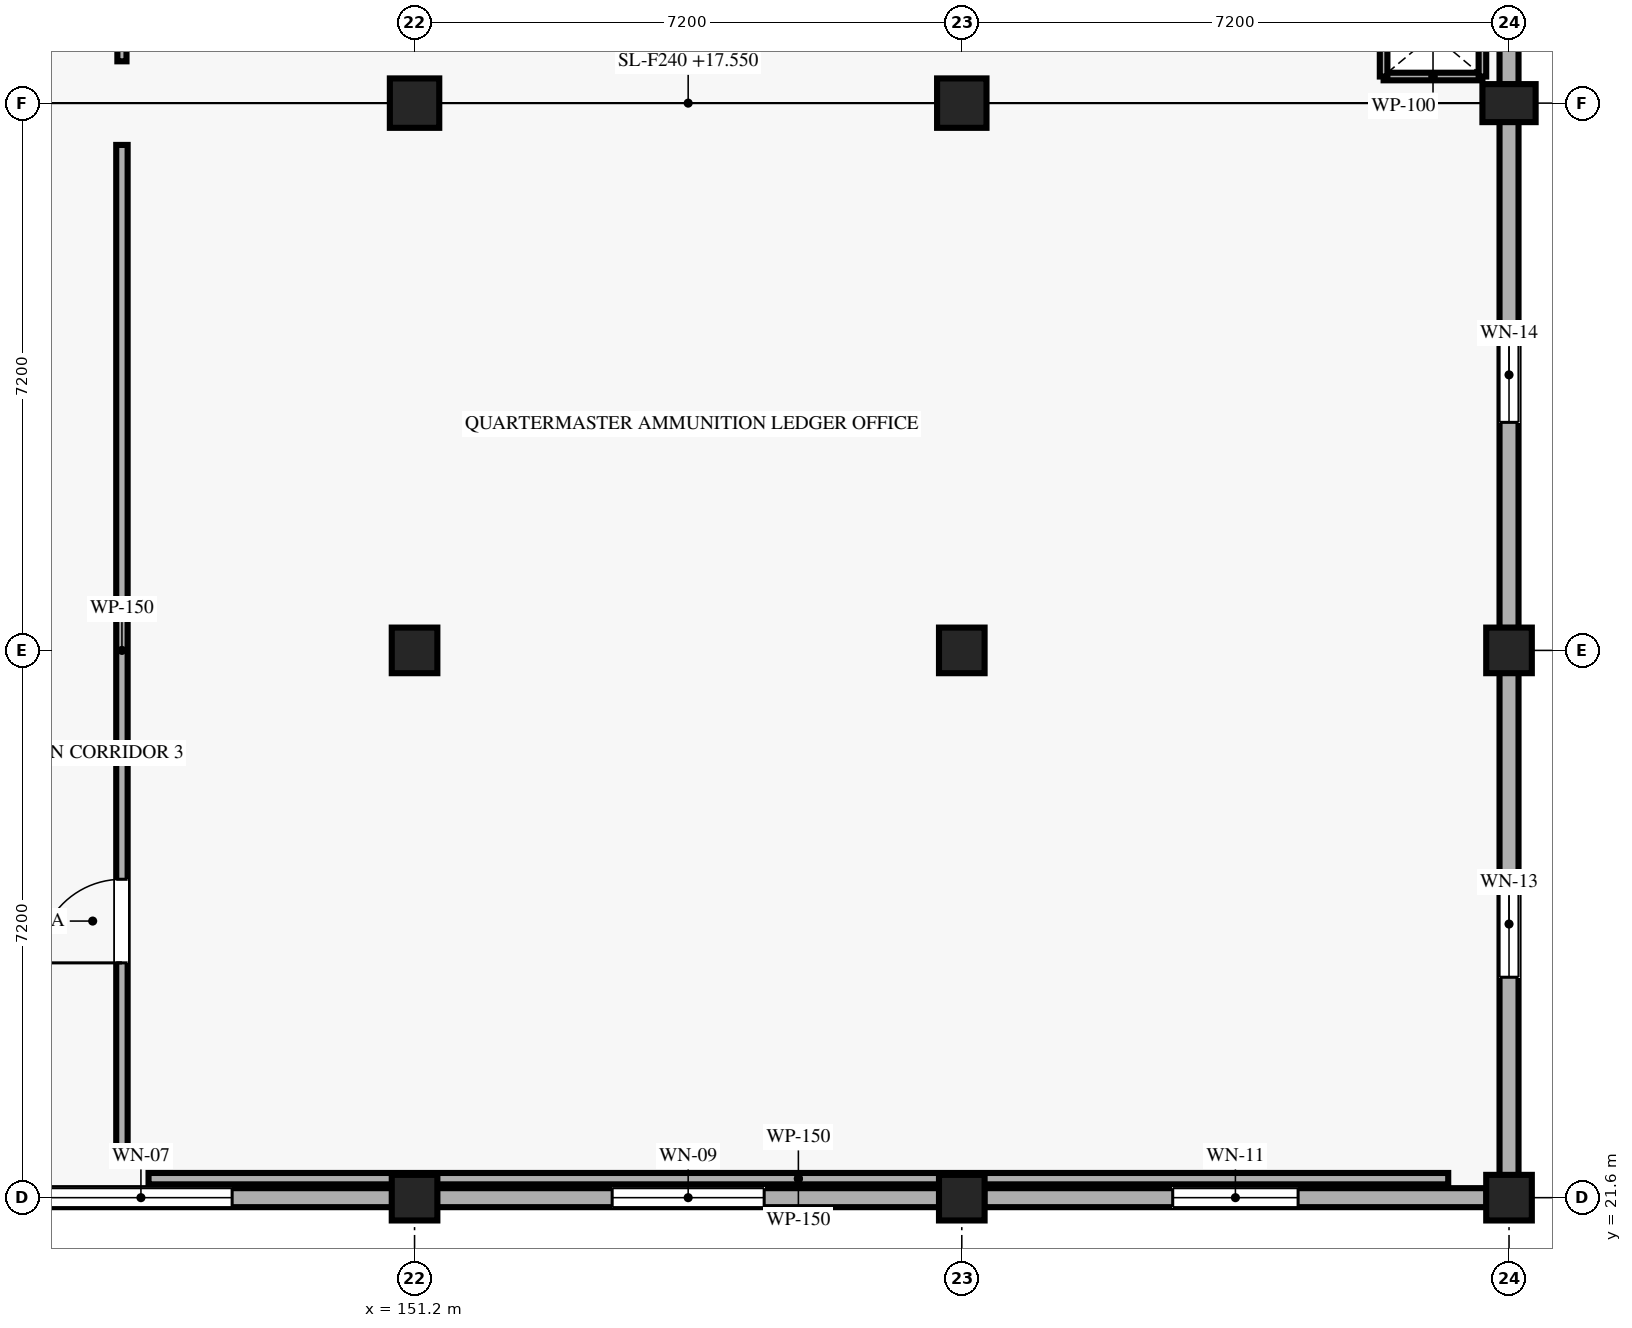
"""IFC4 building model, lengths in metres.
Left out: names, types, materials, properties, quantities, classifications, styles, units other than length and angle.
Written with IfcOpenShell. Run it as: python <this file> out.ifc"""

import sys

from ifc_helpers import new_model, si_unit, direction, frame, frame_2d, origin, origin_2d, place, context, subcontext, project, spatial, rectangle, extrude, element, fill, save


model = new_model("IFC4")
c1 = context("Model", 3, precision=1e-05, world=origin(), true_north=direction((0.0, 1.0)))
c2 = subcontext(c1, "Body", "Model", "MODEL_VIEW")
j1 = project(units=[si_unit("LENGTHUNIT", "METRE"), si_unit("PLANEANGLEUNIT", "RADIAN")], contexts=[c1])
p1 = place(None, origin())
s1 = spatial("IfcSite", under=j1, at=p1, CompositionType="ELEMENT")
p2 = place(p1, origin())
s2 = spatial("IfcBuilding", under=s1, at=p2, CompositionType="ELEMENT")
p3 = place(p2, frame((0.0, 0.0, 17.55)))
s3 = spatial("IfcBuildingStorey", under=s2, at=p3, CompositionType="ELEMENT", Elevation=17.55)
for number, where, z_axis, x_axis in (
    (1, (151.2, 21.6, 0.0), (0.0, 0.0, 1.0), (1.0, 0.0, 0.0)),
    (2, (151.2, 28.8, 0.0), (0.0, 0.0, 1.0), (1.0, 0.0, 0.0)),
):
    element("IfcColumn", number, at=place(p3, frame(where, z_axis=z_axis, x_axis=x_axis)), inside=s3, PredefinedType="COLUMN", context=c2, shape_type="SweptSolid", body=[
        extrude(rectangle(XDim=0.6, YDim=0.6, at=origin_2d()), origin(), (0.0, 0.0, 1.0), 4.05),
    ])
p4 = place(p3, frame((151.2, 36.0, 0.0), z_axis=(0.0, 0.0, 1.0), x_axis=(1.0, 0.0, 0.0)))
e3 = element("IfcColumn", 3, at=p4, inside=s3, PredefinedType="COLUMN", context=c2, shape_type="SweptSolid", body=[
    extrude(rectangle(XDim=0.65, YDim=0.65, at=origin_2d()), origin(), (0.0, 0.0, 1.0), 4.05),
])
for number, where, z_axis, x_axis in (
    (4, (158.4, 21.6, 0.0), (0.0, 0.0, 1.0), (1.0, 0.0, 0.0)),
    (5, (158.4, 28.8, 0.0), (0.0, 0.0, 1.0), (1.0, 0.0, 0.0)),
):
    element("IfcColumn", number, at=place(p3, frame(where, z_axis=z_axis, x_axis=x_axis)), inside=s3, PredefinedType="COLUMN", context=c2, shape_type="SweptSolid", body=[
        extrude(rectangle(XDim=0.6, YDim=0.6, at=origin_2d()), origin(), (0.0, 0.0, 1.0), 4.05),
    ])
p5 = place(p3, frame((158.4, 36.0, 0.0), z_axis=(0.0, 0.0, 1.0), x_axis=(1.0, 0.0, 0.0)))
e6 = element("IfcColumn", 6, at=p5, inside=s3, PredefinedType="COLUMN", context=c2, shape_type="SweptSolid", body=[
    extrude(rectangle(XDim=0.65, YDim=0.65, at=origin_2d()), origin(), (0.0, 0.0, 1.0), 4.05),
])
for number, where, z_axis, x_axis in (
    (7, (165.6, 21.6, 0.0), (0.0, 0.0, 1.0), (1.0, 0.0, 0.0)),
    (8, (165.6, 28.8, 0.0), (0.0, 0.0, 1.0), (1.0, 0.0, 0.0)),
):
    element("IfcColumn", number, at=place(p3, frame(where, z_axis=z_axis, x_axis=x_axis)), inside=s3, PredefinedType="COLUMN", context=c2, shape_type="SweptSolid", body=[
        extrude(rectangle(XDim=0.6, YDim=0.6, at=origin_2d()), origin(), (0.0, 0.0, 1.0), 4.05),
    ])
p6 = place(p3, frame((165.6, 36.0, 0.0), z_axis=(0.0, 0.0, 1.0), x_axis=(0.0, 1.0, 0.0)))
e9 = element("IfcColumn", 9, at=p6, inside=s3, PredefinedType="COLUMN", context=c2, shape_type="SweptSolid", body=[
    extrude(rectangle(XDim=0.5, YDim=0.7, at=origin_2d()), origin(), (0.0, 0.0, 1.0), 4.05),
])
p7 = place(p3, frame((144.295, 21.6, 0.0), z_axis=(0.0, 0.0, 1.0), x_axis=(1.0, 0.0, 0.0)))
e10 = element("IfcWall", 10, at=p7, inside=s3, PredefinedType="SOLIDWALL", context=c2, shape_type="SweptSolid", body=[
    extrude(rectangle(XDim=6.61, YDim=0.25, at=frame_2d((3.305, 0.0))), origin(), (0.0, 0.0, 1.0), 3.295),
])
p8 = place(p7, frame((2.105, 0.0, 0.85)))
e11 = element("IfcOpeningElement", 11, at=p8, cuts=e10, PredefinedType="OPENING", context=c2, shape_type="SweptSolid", body=[
    extrude(rectangle(XDim=2.4, YDim=1.75, at=frame_2d((1.2, 0.875))), frame((0.0, 0.135, 0.0), z_axis=(0.0, -1.0, 0.0), x_axis=(1.0, 0.0, 0.0)), (0.0, 0.0, 1.0), 0.27),
])
p9 = place(p3, frame((151.495, 21.6, 0.0), z_axis=(0.0, 0.0, 1.0), x_axis=(1.0, 0.0, 0.0)))
e12 = element("IfcWall", 12, at=p9, inside=s3, PredefinedType="SOLIDWALL", context=c2, shape_type="SweptSolid", body=[
    extrude(rectangle(XDim=6.61, YDim=0.25, at=frame_2d((3.305, 0.0))), origin(), (0.0, 0.0, 1.0), 3.295),
])
p10 = place(p9, frame((2.305, 0.0, 0.85)))
e13 = element("IfcOpeningElement", 13, at=p10, cuts=e12, PredefinedType="OPENING", context=c2, shape_type="SweptSolid", body=[
    extrude(rectangle(XDim=2.0, YDim=1.65, at=frame_2d((1.0, 0.825))), frame((0.0, 0.135, 0.0), z_axis=(0.0, -1.0, 0.0), x_axis=(1.0, 0.0, 0.0)), (0.0, 0.0, 1.0), 0.27),
])
p11 = place(p3, frame((158.695, 21.6, 0.0), z_axis=(0.0, 0.0, 1.0), x_axis=(1.0, 0.0, 0.0)))
e14 = element("IfcWall", 14, at=p11, inside=s3, PredefinedType="SOLIDWALL", context=c2, shape_type="SweptSolid", body=[
    extrude(rectangle(XDim=6.61, YDim=0.25, at=frame_2d((3.305, 0.0))), origin(), (0.0, 0.0, 1.0), 3.295),
])
p12 = place(p11, frame((2.48, 0.0, 0.85)))
e15 = element("IfcOpeningElement", 15, at=p12, cuts=e14, PredefinedType="OPENING", context=c2, shape_type="SweptSolid", body=[
    extrude(rectangle(XDim=1.65, YDim=1.55, at=frame_2d((0.825, 0.775))), frame((0.0, 0.135, 0.0), z_axis=(0.0, -1.0, 0.0), x_axis=(1.0, 0.0, 0.0)), (0.0, 0.0, 1.0), 0.27),
])
p13 = place(p3, frame((165.6, 21.895, 0.0), z_axis=(0.0, 0.0, 1.0), x_axis=(0.0, 1.0, 0.0)))
e16 = element("IfcWall", 16, at=p13, inside=s3, PredefinedType="SOLIDWALL", context=c2, shape_type="SweptSolid", body=[
    extrude(rectangle(XDim=6.61, YDim=0.25, at=frame_2d((3.305, 0.0))), origin(), (0.0, 0.0, 1.0), 3.295),
])
p14 = place(p13, frame((2.605, 0.0, 0.85)))
e17 = element("IfcOpeningElement", 17, at=p14, cuts=e16, PredefinedType="OPENING", context=c2, shape_type="SweptSolid", body=[
    extrude(rectangle(XDim=1.4, YDim=1.6, at=frame_2d((0.7, 0.8))), frame((0.0, 0.135, 0.0), z_axis=(0.0, -1.0, 0.0), x_axis=(1.0, 0.0, 0.0)), (0.0, 0.0, 1.0), 0.27),
])
p15 = place(p3, frame((165.6, 29.095, 0.0), z_axis=(0.0, 0.0, 1.0), x_axis=(0.0, 1.0, 0.0)))
e18 = element("IfcWall", 18, at=p15, inside=s3, PredefinedType="SOLIDWALL", context=c2, shape_type="SweptSolid", body=[
    extrude(rectangle(XDim=6.66, YDim=0.25, at=frame_2d((3.33, 0.0))), origin(), (0.0, 0.0, 1.0), 3.295),
])
p16 = place(p15, frame((2.705, 0.0, 0.85)))
e19 = element("IfcOpeningElement", 19, at=p16, cuts=e18, PredefinedType="OPENING", context=c2, shape_type="SweptSolid", body=[
    extrude(rectangle(XDim=1.25, YDim=1.5, at=frame_2d((0.625, 0.75))), frame((0.0, 0.135, 0.0), z_axis=(0.0, -1.0, 0.0), x_axis=(1.0, 0.0, 0.0)), (0.0, 0.0, 1.0), 0.27),
])
p17 = place(p3, frame((165.6, 36.245, 0.0), z_axis=(0.0, 0.0, 1.0), x_axis=(0.0, 1.0, 0.0)))
e20 = element("IfcWall", 20, at=p17, inside=s3, PredefinedType="SOLIDWALL", context=c2, shape_type="SweptSolid", body=[
    extrude(rectangle(XDim=3.16, YDim=0.25, at=frame_2d((1.58, 0.0))), origin(), (0.0, 0.0, 1.0), 3.295),
])
p18 = place(p17, frame((0.955, 0.0, 0.85)))
e21 = element("IfcOpeningElement", 21, at=p18, cuts=e20, PredefinedType="OPENING", context=c2, shape_type="SweptSolid", body=[
    extrude(rectangle(XDim=1.25, YDim=1.5, at=frame_2d((0.625, 0.75))), frame((0.0, 0.135, 0.0), z_axis=(0.0, -1.0, 0.0), x_axis=(1.0, 0.0, 0.0)), (0.0, 0.0, 1.0), 0.27),
])
p19 = place(p3, frame((163.95, 36.35, 0.0), z_axis=(0.0, 0.0, 1.0), x_axis=(1.0, 0.0, 0.0)))
e22 = element("IfcWall", 22, at=p19, inside=s3, PredefinedType="PARTITIONING", context=c2, shape_type="SweptSolid", body=[
    extrude(rectangle(XDim=1.3, YDim=0.1, at=frame_2d((0.65, 0.0))), origin(), (0.0, 0.0, 1.0), 3.27),
])
p20 = place(p3, frame((163.95, 36.35, 0.0), z_axis=(0.0, 0.0, 1.0), x_axis=(0.0, 1.0, 0.0)))
e23 = element("IfcWall", 23, at=p20, inside=s3, PredefinedType="PARTITIONING", context=c2, shape_type="SweptSolid", body=[
    extrude(rectangle(XDim=1.1, YDim=0.1, at=frame_2d((0.55, 0.0))), origin(), (0.0, 0.0, 1.0), 3.83),
])
p21 = place(p3, frame((165.25, 36.35, 0.0), z_axis=(0.0, 0.0, 1.0), x_axis=(0.0, 1.0, 0.0)))
e24 = element("IfcWall", 24, at=p21, inside=s3, PredefinedType="PARTITIONING", context=c2, shape_type="SweptSolid", body=[
    extrude(rectangle(XDim=1.1, YDim=0.1, at=frame_2d((0.55, 0.0))), origin(), (0.0, 0.0, 1.0), 3.3),
])
p22 = place(p3, frame((147.35, 36.55, 0.0), z_axis=(0.0, 0.0, 1.0), x_axis=(0.0, 1.0, 0.0)))
e25 = element("IfcWall", 25, at=p22, inside=s3, PredefinedType="PARTITIONING", context=c2, shape_type="SweptSolid", body=[
    extrude(rectangle(XDim=15.95, YDim=0.12, at=frame_2d((7.975, 0.0))), origin(), (0.0, 0.0, 1.0), 3.83),
])
p23 = place(p22, frame((2.25, 0.0, 0.0)))
e26 = element("IfcOpeningElement", 26, at=p23, cuts=e25, PredefinedType="OPENING", context=c2, shape_type="SweptSolid", body=[
    extrude(rectangle(XDim=1.7, YDim=2.2, at=frame_2d((0.85, 1.1))), frame((0.0, 0.07, 0.0), z_axis=(0.0, -1.0, 0.0), x_axis=(1.0, 0.0, 0.0)), (0.0, 0.0, 1.0), 0.14),
])
p24 = place(p3, frame((147.7, 21.85, 0.0), z_axis=(0.0, 0.0, 1.0), x_axis=(1.0, 0.0, 0.0)))
e27 = element("IfcWall", 27, at=p24, inside=s3, PredefinedType="PARTITIONING", context=c2, shape_type="SweptSolid", body=[
    extrude(rectangle(XDim=17.1, YDim=0.15, at=frame_2d((8.55, 0.0))), origin(), (0.0, 0.0, 1.0), 3.3),
])
p25 = place(p3, frame((147.35, 22.15, 0.0), z_axis=(0.0, 0.0, 1.0), x_axis=(0.0, 1.0, 0.0)))
e28 = element("IfcWall", 28, at=p25, inside=s3, PredefinedType="PARTITIONING", context=c2, shape_type="SweptSolid", body=[
    extrude(rectangle(XDim=13.3, YDim=0.15, at=frame_2d((6.65, 0.0))), origin(), (0.0, 0.0, 1.0), 3.83),
])
p26 = place(p25, frame((2.539, 0.0, 0.0)))
e29 = element("IfcOpeningElement", 29, at=p26, cuts=e28, PredefinedType="OPENING", context=c2, shape_type="SweptSolid", body=[
    extrude(rectangle(XDim=1.1, YDim=2.2, at=frame_2d((0.55, 1.1))), frame((0.0, 0.085, 0.0), z_axis=(0.0, -1.0, 0.0), x_axis=(1.0, 0.0, 0.0)), (0.0, 0.0, 1.0), 0.17),
])
p27 = place(p8, origin())
e30 = element("IfcWindow", 30, at=p27, inside=s3, PartitioningType="SINGLE_PANEL", PredefinedType="WINDOW", context=c2, shape_type="SweptSolid", body=[
    extrude(rectangle(XDim=2.4, YDim=1.75, at=frame_2d((1.2, 0.875))), frame((0.0, 0.03, 0.0), z_axis=(0.0, -1.0, 0.0), x_axis=(1.0, 0.0, 0.0)), (0.0, 0.0, 1.0), 0.06),
])
fill(e11, e30)
p28 = place(p10, origin())
e31 = element("IfcWindow", 31, at=p28, inside=s3, PartitioningType="SINGLE_PANEL", PredefinedType="WINDOW", context=c2, shape_type="SweptSolid", body=[
    extrude(rectangle(XDim=2.0, YDim=1.65, at=frame_2d((1.0, 0.825))), frame((0.0, 0.03, 0.0), z_axis=(0.0, -1.0, 0.0), x_axis=(1.0, 0.0, 0.0)), (0.0, 0.0, 1.0), 0.06),
])
fill(e13, e31)
p29 = place(p12, origin())
e32 = element("IfcWindow", 32, at=p29, inside=s3, PartitioningType="SINGLE_PANEL", PredefinedType="WINDOW", context=c2, shape_type="SweptSolid", body=[
    extrude(rectangle(XDim=1.65, YDim=1.55, at=frame_2d((0.825, 0.775))), frame((0.0, 0.03, 0.0), z_axis=(0.0, -1.0, 0.0), x_axis=(1.0, 0.0, 0.0)), (0.0, 0.0, 1.0), 0.06),
])
fill(e15, e32)
p30 = place(p14, origin())
e33 = element("IfcWindow", 33, at=p30, inside=s3, PartitioningType="SINGLE_PANEL", PredefinedType="WINDOW", context=c2, shape_type="SweptSolid", body=[
    extrude(rectangle(XDim=1.4, YDim=1.6, at=frame_2d((0.7, 0.8))), frame((0.0, 0.03, 0.0), z_axis=(0.0, -1.0, 0.0), x_axis=(1.0, 0.0, 0.0)), (0.0, 0.0, 1.0), 0.06),
])
fill(e17, e33)
p31 = place(p16, origin())
e34 = element("IfcWindow", 34, at=p31, inside=s3, PartitioningType="SINGLE_PANEL", PredefinedType="WINDOW", context=c2, shape_type="SweptSolid", body=[
    extrude(rectangle(XDim=1.25, YDim=1.5, at=frame_2d((0.625, 0.75))), frame((0.0, 0.03, 0.0), z_axis=(0.0, -1.0, 0.0), x_axis=(1.0, 0.0, 0.0)), (0.0, 0.0, 1.0), 0.06),
])
fill(e19, e34)
p32 = place(p26, origin())
e35 = element("IfcDoor", 35, at=p32, inside=s3, OperationType="SINGLE_SWING_LEFT", PredefinedType="DOOR", context=c2, shape_type="SweptSolid", body=[
    extrude(rectangle(XDim=1.1, YDim=2.2, at=frame_2d((0.55, 1.1))), frame((0.0, 0.025, 0.0), z_axis=(0.0, -1.0, 0.0), x_axis=(1.0, 0.0, 0.0)), (0.0, 0.0, 1.0), 0.05),
])
fill(e29, e35)
save(model, sys.argv[1])
